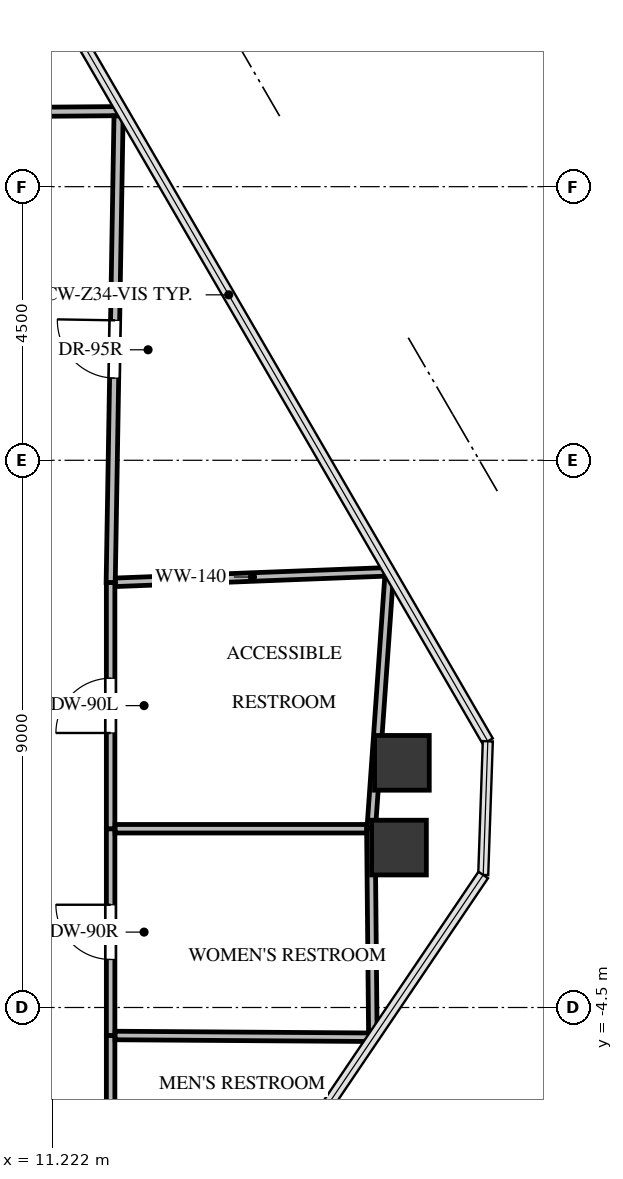
"""IFC4 building model, lengths in metres.
Left out: names, types, materials, properties, quantities, classifications, styles, units other than length and angle.
Written with IfcOpenShell. Run it as: python <this file> out.ifc"""

import sys

from ifc_helpers import new_model, si_unit, direction, frame, frame_2d, origin, origin_2d, place, context, subcontext, project, spatial, rectangle, extrude, source, transform, mapped, element, fill, save


model = new_model("IFC4")
c1 = context("Model", 3, precision=1e-05, world=origin(), true_north=direction((0.0, 1.0)))
c2 = subcontext(c1, "Body", "Model", "MODEL_VIEW")
j1 = project(units=[si_unit("LENGTHUNIT", "METRE"), si_unit("PLANEANGLEUNIT", "RADIAN")], contexts=[c1])
p1 = place(None, origin())
s1 = spatial("IfcSite", under=j1, at=p1, CompositionType="ELEMENT")
p2 = place(p1, origin())
s2 = spatial("IfcBuilding", under=s1, at=p2, CompositionType="ELEMENT")
p3 = place(p2, frame((0.0, 0.0, 241.4)))
s3 = spatial("IfcBuildingStorey", under=s2, at=p3, CompositionType="ELEMENT", Elevation=241.4)
m1 = source(origin(), c2, "Body", "SweptSolid", [
    extrude(rectangle(XDim=0.9, YDim=0.9, at=origin_2d()), origin(), (0.0, 0.0, 1.0), 3.3),
])
for number, where, z_axis, x_axis in (
    (1, (16.97, -0.476, -0.24), (0.0, 0.0, 1.0), (1.0, 0.0, 0.0)),
    (2, (16.922, -1.87, -0.24), (0.0, 0.0, 1.0), (1.0, 0.0, 0.0)),
):
    element("IfcColumn", number, at=place(p3, frame(where, z_axis=z_axis, x_axis=x_axis)), inside=s3, PredefinedType="COLUMN", context=c2, shape_type="MappedRepresentation", body=[
        mapped(m1, transform((0.0, 0.0, 0.0), x_axis=(1.0, 0.0, 0.0), y_axis=(0.0, 1.0, 0.0), z_axis=(0.0, 0.0, 1.0), scale=1.0)),
    ])
p4 = place(p3, frame((12.18, -8.44, 0.0), z_axis=(0.0, 0.0, 1.0), x_axis=(0.0, 1.0, 0.0)))
e3 = element("IfcWall", 3, at=p4, inside=s3, PredefinedType="PARTITIONING", context=c2, shape_type="SweptSolid", body=[
    extrude(rectangle(XDim=3.48, YDim=0.14, at=frame_2d((1.74, 0.0))), origin(), (0.0, 0.0, 1.0), 2.399),
])
p5 = place(p4, frame((1.29, 0.0, 0.0)))
e4 = element("IfcOpeningElement", 4, at=p5, cuts=e3, PredefinedType="OPENING", context=c2, shape_type="SweptSolid", body=[
    extrude(rectangle(XDim=0.9, YDim=2.05, at=frame_2d((0.45, 1.025))), frame((0.0, 0.08, 0.0), z_axis=(0.0, -1.0, 0.0), x_axis=(1.0, 0.0, 0.0)), (0.0, 0.0, 1.0), 0.16),
])
p6 = place(p3, frame((12.18, -4.96, 0.0), z_axis=(0.0, 0.0, 1.0), x_axis=(0.0, 1.0, 0.0)))
e5 = element("IfcWall", 5, at=p6, inside=s3, PredefinedType="PARTITIONING", context=c2, shape_type="SweptSolid", body=[
    extrude(rectangle(XDim=3.4, YDim=0.14, at=frame_2d((1.7, 0.0))), origin(), (0.0, 0.0, 1.0), 3.045),
])
p7 = place(p6, frame((1.25, 0.0, 0.0)))
e6 = element("IfcOpeningElement", 6, at=p7, cuts=e5, PredefinedType="OPENING", context=c2, shape_type="SweptSolid", body=[
    extrude(rectangle(XDim=0.9, YDim=2.05, at=frame_2d((0.45, 1.025))), frame((0.0, 0.08, 0.0), z_axis=(0.0, -1.0, 0.0), x_axis=(1.0, 0.0, 0.0)), (0.0, 0.0, 1.0), 0.16),
])
p8 = place(p3, frame((12.18, -1.56, 0.0), z_axis=(0.0, 0.0, 1.0), x_axis=(0.0, 1.0, 0.0)))
e7 = element("IfcWall", 7, at=p8, inside=s3, PredefinedType="PARTITIONING", context=c2, shape_type="SweptSolid", body=[
    extrude(rectangle(XDim=4.05, YDim=0.14, at=frame_2d((2.025, 0.0))), origin(), (0.0, 0.0, 1.0), 2.302),
])
p9 = place(p8, frame((1.575, 0.0, 0.0)))
e8 = element("IfcOpeningElement", 8, at=p9, cuts=e7, PredefinedType="OPENING", context=c2, shape_type="SweptSolid", body=[
    extrude(rectangle(XDim=0.9, YDim=2.05, at=frame_2d((0.45, 1.025))), frame((0.0, 0.08, 0.0), z_axis=(0.0, -1.0, 0.0), x_axis=(1.0, 0.0, 0.0)), (0.0, 0.0, 1.0), 0.16),
])
p10 = place(p3, frame((12.368, 10.243, 0.0), z_axis=(0.0, 0.0, 1.0), x_axis=(-0.999968379606, -0.007952344825, 0.0)))
e9 = element("IfcWall", 9, at=p10, inside=s3, PredefinedType="PARTITIONING", context=c2, shape_type="SweptSolid", body=[
    extrude(rectangle(XDim=7.829, YDim=0.15, at=frame_2d((3.914, 0.0))), origin(), (0.0, 0.0, 1.0), 2.302),
])
p11 = place(p10, frame((3.439, 0.0, 0.0)))
e10 = element("IfcOpeningElement", 10, at=p11, cuts=e9, PredefinedType="OPENING", context=c2, shape_type="SweptSolid", body=[
    extrude(rectangle(XDim=0.95, YDim=2.1, at=frame_2d((0.475, 1.05))), frame((0.0, 0.085, 0.0), z_axis=(0.0, -1.0, 0.0), x_axis=(1.0, 0.0, 0.0)), (0.0, 0.0, 1.0), 0.17),
])
p12 = place(p3, frame((12.181, 2.49, 0.0), z_axis=(0.0, 0.0, 1.0), x_axis=(0.016828669653, 0.999858387912, 0.0)))
e11 = element("IfcWall", 11, at=p12, inside=s3, PredefinedType="PARTITIONING", context=c2, shape_type="SweptSolid", body=[
    extrude(rectangle(XDim=7.674, YDim=0.15, at=frame_2d((3.837, 0.0))), origin(), (0.0, 0.0, 1.0), 2.399),
])
p13 = place(p12, frame((3.362, 0.0, 0.0)))
e12 = element("IfcOpeningElement", 12, at=p13, cuts=e11, PredefinedType="OPENING", context=c2, shape_type="SweptSolid", body=[
    extrude(rectangle(XDim=0.95, YDim=2.1, at=frame_2d((0.475, 1.05))), frame((0.0, 0.085, 0.0), z_axis=(0.0, -1.0, 0.0), x_axis=(1.0, 0.0, 0.0)), (0.0, 0.0, 1.0), 0.17),
])
p14 = place(p3, frame((12.254, -4.96, 0.0), z_axis=(0.0, 0.0, 1.0), x_axis=(0.999976630429, -0.006836563198, 0.0)))
e13 = element("IfcWall", 13, at=p14, inside=s3, PredefinedType="PARTITIONING", context=c2, shape_type="SweptSolid", body=[
    extrude(rectangle(XDim=4.25, YDim=0.14, at=frame_2d((2.125, 0.0))), origin(), (0.0, 0.0, 1.0), 2.399),
])
p15 = place(p3, frame((12.254, -1.56, 0.0), z_axis=(0.0, 0.0, 1.0), x_axis=(1.0, 0.0, 0.0)))
e14 = element("IfcWall", 14, at=p15, inside=s3, PredefinedType="PARTITIONING", context=c2, shape_type="SweptSolid", body=[
    extrude(rectangle(XDim=4.206, YDim=0.14, at=frame_2d((2.103, 0.0))), origin(), (0.0, 0.0, 1.0), 2.302),
])
p16 = place(p3, frame((16.46, -1.56, 0.0), z_axis=(0.0, 0.0, 1.0), x_axis=(0.009604446748, -0.999953876238, 0.0)))
e15 = element("IfcWall", 15, at=p16, inside=s3, PredefinedType="PARTITIONING", context=c2, shape_type="SweptSolid", body=[
    extrude(rectangle(XDim=3.355, YDim=0.14, at=frame_2d((1.678, 0.0))), origin(), (0.0, 0.0, 1.0), 2.302),
])
p17 = place(p3, frame((12.26, 2.493, 0.0), z_axis=(0.0, 0.0, 1.0), x_axis=(0.999256206289, 0.038562082324, 0.0)))
e16 = element("IfcWall", 16, at=p17, inside=s3, PredefinedType="PARTITIONING", context=c2, shape_type="SweptSolid", body=[
    extrude(rectangle(XDim=4.508, YDim=0.14, at=frame_2d((2.254, 0.0))), origin(), (0.0, 0.0, 1.0), 2.399),
])
p18 = place(p3, frame((16.76, 2.593, 0.0), z_axis=(0.0, 0.0, 1.0), x_axis=(-0.07055102187, -0.997508172053, 0.0)))
e17 = element("IfcWall", 17, at=p18, inside=s3, PredefinedType="PARTITIONING", context=c2, shape_type="SweptSolid", body=[
    extrude(rectangle(XDim=4.163, YDim=0.14, at=frame_2d((2.082, 0.0))), origin(), (0.0, 0.0, 1.0), 2.302),
])
m2 = source(origin(), c2, "Body", "SweptSolid", [
    extrude(rectangle(XDim=0.9, YDim=2.05, at=frame_2d((0.45, 1.025))), frame((0.0, 0.025, 0.0), z_axis=(0.0, -1.0, 0.0), x_axis=(1.0, 0.0, 0.0)), (0.0, 0.0, 1.0), 0.05),
])
p19 = place(p7, origin())
e18 = element("IfcDoor", 18, at=p19, inside=s3, OperationType="SINGLE_SWING_RIGHT", PredefinedType="DOOR", context=c2, shape_type="MappedRepresentation", body=[
    mapped(m2, transform((0.0, 0.0, 0.0), x_axis=(1.0, 0.0, 0.0), y_axis=(0.0, 1.0, 0.0), z_axis=(0.0, 0.0, 1.0), scale=1.0)),
])
fill(e6, e18)
m3 = source(origin(), c2, "Body", "SweptSolid", [
    extrude(rectangle(XDim=0.9, YDim=2.05, at=frame_2d((0.45, 1.025))), frame((0.0, 0.025, 0.0), z_axis=(0.0, -1.0, 0.0), x_axis=(1.0, 0.0, 0.0)), (0.0, 0.0, 1.0), 0.05),
])
p20 = place(p9, origin())
e19 = element("IfcDoor", 19, at=p20, inside=s3, OperationType="SINGLE_SWING_LEFT", PredefinedType="DOOR", context=c2, shape_type="MappedRepresentation", body=[
    mapped(m3, transform((0.0, 0.0, 0.0), x_axis=(1.0, 0.0, 0.0), y_axis=(0.0, 1.0, 0.0), z_axis=(0.0, 0.0, 1.0), scale=1.0)),
])
fill(e8, e19)
m4 = source(origin(), c2, "Body", "SweptSolid", [
    extrude(rectangle(XDim=0.95, YDim=2.1, at=frame_2d((0.475, 1.05))), frame((0.0, 0.025, 0.0), z_axis=(0.0, -1.0, 0.0), x_axis=(1.0, 0.0, 0.0)), (0.0, 0.0, 1.0), 0.05),
])
p21 = place(p13, origin())
e20 = element("IfcDoor", 20, at=p21, inside=s3, OperationType="SINGLE_SWING_RIGHT", PredefinedType="DOOR", context=c2, shape_type="MappedRepresentation", body=[
    mapped(m4, transform((0.0, 0.0, 0.0), x_axis=(1.0, 0.0, 0.0), y_axis=(0.0, 1.0, 0.0), z_axis=(0.0, 0.0, 1.0), scale=1.0)),
])
fill(e12, e20)
save(model, sys.argv[1])
